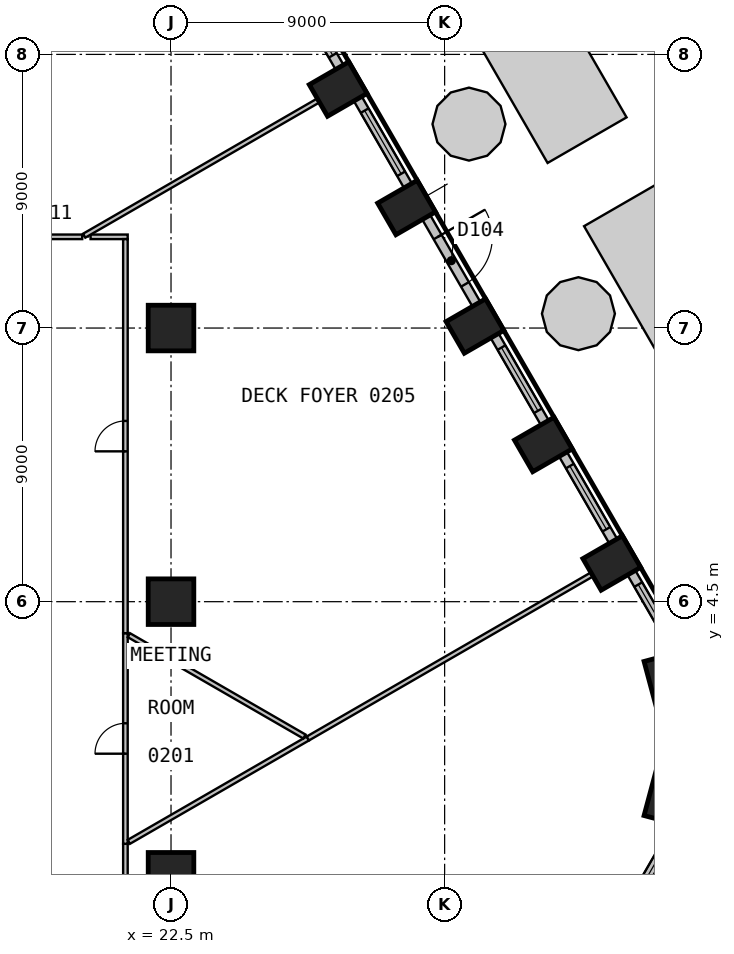
"""IFC4 building model, lengths in metres.
Left out: names, types, materials, properties, quantities, classifications, styles, units other than length and angle.
Written with IfcOpenShell. Run it as: python <this file> out.ifc"""

import sys

from ifc_helpers import new_model, si_unit, direction, frame, frame_2d, origin, origin_2d, place, context, subcontext, project, spatial, polyline, rectangle, circle, outline, extrude, element, fill, save


model = new_model("IFC4")
c1 = context("Model", 3, precision=1e-05, world=origin(), true_north=direction((0.0, 1.0)))
c2 = subcontext(c1, "Body", "Model", "MODEL_VIEW")
j1 = project(units=[si_unit("LENGTHUNIT", "METRE"), si_unit("PLANEANGLEUNIT", "RADIAN")], contexts=[c1])
p1 = place(None, origin())
s1 = spatial("IfcSite", under=j1, at=p1, CompositionType="ELEMENT")
p2 = place(p1, origin())
s2 = spatial("IfcBuilding", under=s1, at=p2, CompositionType="ELEMENT")
p3 = place(p2, frame((0.0, 0.0, 10.8)))
s3 = spatial("IfcBuildingStorey", under=s2, at=p3, CompositionType="ELEMENT", Elevation=10.8)
for number, where, z_axis, x_axis in (
    (1, (38.979, -2.004, 0.0), (0.0, 0.0, 1.0), (0.259, 0.966, 0.0)),
    (2, (38.979, 2.004, 0.0), (0.0, 0.0, 1.0), (-0.259, 0.966, 0.0)),
):
    element("IfcColumn", number, at=place(p3, frame(where, z_axis=z_axis, x_axis=x_axis)), inside=s3, PredefinedType="COLUMN", context=c2, shape_type="SweptSolid", body=[
        extrude(rectangle(XDim=1.5, YDim=1.5, at=origin_2d()), origin(), (0.0, 0.0, 1.0), 4.4),
    ])
for number, where, z_axis, x_axis in (
    (3, (36.998, 5.772, 0.0), (0.0, 0.0, 1.0), (-0.5, 0.866, 0.0)),
    (4, (34.748, 9.669, 0.0), (0.0, 0.0, 1.0), (-0.5, 0.866, 0.0)),
    (5, (32.498, 13.566, 0.0), (0.0, 0.0, 1.0), (-0.5, 0.866, 0.0)),
    (6, (30.248, 17.463, 0.0), (0.0, 0.0, 1.0), (-0.5, 0.866, 0.0)),
    (7, (27.998, 21.361, 0.0), (0.0, 0.0, 1.0), (-0.5, 0.866, 0.0)),
):
    element("IfcColumn", number, at=place(p3, frame(where, z_axis=z_axis, x_axis=x_axis)), inside=s3, PredefinedType="COLUMN", context=c2, shape_type="SweptSolid", body=[
        extrude(rectangle(XDim=1.2, YDim=1.5, at=origin_2d()), origin(), (0.0, 0.0, 1.0), 4.4),
    ])
for number, where, z_axis, x_axis in (
    (8, (22.5, -4.5, 0.0), (0.0, 0.0, 1.0), (1.0, 0.0, 0.0)),
    (9, (22.5, 4.5, 0.0), (0.0, 0.0, 1.0), (1.0, 0.0, 0.0)),
    (10, (22.5, 13.5, 0.0), (0.0, 0.0, 1.0), (1.0, 0.0, 0.0)),
):
    element("IfcColumn", number, at=place(p3, frame(where, z_axis=z_axis, x_axis=x_axis)), inside=s3, PredefinedType="COLUMN", context=c2, shape_type="SweptSolid", body=[
        extrude(circle(Radius=0.75, at=origin_2d()), origin(), (0.0, 0.0, 1.0), 4.4),
    ])
p4 = place(p3, frame((37.644, -5.452, 0.0), z_axis=(0.0, 0.0, 1.0), x_axis=(0.49999586137, 0.866027793211, 0.0)))
e11 = element("IfcWall", 11, at=p4, inside=s3, PredefinedType="SOLIDWALL", context=c2, shape_type="SweptSolid", body=[
    extrude(rectangle(XDim=2.989, YDim=0.3, at=frame_2d((1.494, 0.0))), origin(), (0.0, 0.0, 1.0), 4.4),
])
p5 = place(p4, frame((0.449, 0.0, 0.9)))
e12 = element("IfcOpeningElement", 12, at=p5, cuts=e11, PredefinedType="OPENING", context=c2, shape_type="SweptSolid", body=[
    extrude(rectangle(XDim=2.4, YDim=3.0, at=frame_2d((1.2, 1.5))), frame((0.0, 0.16, 0.0), z_axis=(0.0, -1.0, 0.0), x_axis=(1.0, 0.0, 0.0)), (0.0, 0.0, 1.0), 0.32),
])
p6 = place(p3, frame((39.139, 2.864, 0.0), z_axis=(0.0, 0.0, 1.0), x_axis=(-0.49999586137, 0.866027793211, 0.0)))
e13 = element("IfcWall", 13, at=p6, inside=s3, PredefinedType="SOLIDWALL", context=c2, shape_type="SweptSolid", body=[
    extrude(rectangle(XDim=2.989, YDim=0.3, at=frame_2d((1.494, 0.0))), origin(), (0.0, 0.0, 1.0), 4.4),
])
p7 = place(p6, frame((0.139, 0.0, 0.9)))
e14 = element("IfcOpeningElement", 14, at=p7, cuts=e13, PredefinedType="OPENING", context=c2, shape_type="SweptSolid", body=[
    extrude(rectangle(XDim=2.4, YDim=3.0, at=frame_2d((1.2, 1.5))), frame((0.0, 0.16, 0.0), z_axis=(0.0, -1.0, 0.0), x_axis=(1.0, 0.0, 0.0)), (0.0, 0.0, 1.0), 0.32),
])
p8 = place(p3, frame((37.044, 6.492, 0.0), z_axis=(0.0, 0.0, 1.0), x_axis=(-0.499991515992, 0.866030301974, 0.0)))
e15 = element("IfcWall", 15, at=p8, inside=s3, PredefinedType="SOLIDWALL", context=c2, shape_type="SweptSolid", body=[
    extrude(rectangle(XDim=3.299, YDim=0.3, at=frame_2d((1.649, 0.0))), origin(), (0.0, 0.0, 1.0), 4.4),
])
p9 = place(p8, frame((0.449, 0.0, 0.9)))
e16 = element("IfcOpeningElement", 16, at=p9, cuts=e15, PredefinedType="OPENING", context=c2, shape_type="SweptSolid", body=[
    extrude(rectangle(XDim=2.4, YDim=3.0, at=frame_2d((1.2, 1.5))), frame((0.0, 0.16, 0.0), z_axis=(0.0, -1.0, 0.0), x_axis=(1.0, 0.0, 0.0)), (0.0, 0.0, 1.0), 0.32),
])
p10 = place(p3, frame((34.794, 10.389, 0.0), z_axis=(0.0, 0.0, 1.0), x_axis=(-0.499991515992, 0.866030301974, 0.0)))
e17 = element("IfcWall", 17, at=p10, inside=s3, PredefinedType="SOLIDWALL", context=c2, shape_type="SweptSolid", body=[
    extrude(rectangle(XDim=3.299, YDim=0.3, at=frame_2d((1.649, 0.0))), origin(), (0.0, 0.0, 1.0), 4.4),
])
p11 = place(p10, frame((0.449, 0.0, 0.9)))
e18 = element("IfcOpeningElement", 18, at=p11, cuts=e17, PredefinedType="OPENING", context=c2, shape_type="SweptSolid", body=[
    extrude(rectangle(XDim=2.4, YDim=3.0, at=frame_2d((1.2, 1.5))), frame((0.0, 0.16, 0.0), z_axis=(0.0, -1.0, 0.0), x_axis=(1.0, 0.0, 0.0)), (0.0, 0.0, 1.0), 0.32),
])
p12 = place(p3, frame((30.894, 17.143, 0.0), z_axis=(0.0, 0.0, 1.0), x_axis=(0.499991515992, -0.866030301974, 0.0)))
e19 = element("IfcWall", 19, at=p12, inside=s3, PredefinedType="SOLIDWALL", context=c2, shape_type="SweptSolid", body=[
    extrude(rectangle(XDim=3.299, YDim=0.3, at=frame_2d((1.649, 0.0))), origin(), (0.0, 0.0, 1.0), 4.4),
])
p13 = place(p12, frame((0.75, 0.0, 0.0)))
e20 = element("IfcOpeningElement", 20, at=p13, cuts=e19, PredefinedType="OPENING", context=c2, shape_type="SweptSolid", body=[
    extrude(rectangle(XDim=1.8, YDim=2.4, at=frame_2d((0.9, 1.2))), frame((0.0, 0.16, 0.0), z_axis=(0.0, -1.0, 0.0), x_axis=(1.0, 0.0, 0.0)), (0.0, 0.0, 1.0), 0.32),
])
p14 = place(p3, frame((30.294, 18.184, 0.0), z_axis=(0.0, 0.0, 1.0), x_axis=(-0.499991515992, 0.866030301974, 0.0)))
e21 = element("IfcWall", 21, at=p14, inside=s3, PredefinedType="SOLIDWALL", context=c2, shape_type="SweptSolid", body=[
    extrude(rectangle(XDim=3.299, YDim=0.3, at=frame_2d((1.649, 0.0))), origin(), (0.0, 0.0, 1.0), 4.4),
])
p15 = place(p14, frame((0.449, 0.0, 0.9)))
e22 = element("IfcOpeningElement", 22, at=p15, cuts=e21, PredefinedType="OPENING", context=c2, shape_type="SweptSolid", body=[
    extrude(rectangle(XDim=2.4, YDim=3.0, at=frame_2d((1.2, 1.5))), frame((0.0, 0.16, 0.0), z_axis=(0.0, -1.0, 0.0), x_axis=(1.0, 0.0, 0.0)), (0.0, 0.0, 1.0), 0.32),
])
p16 = place(p3, frame((28.044, 22.081, 0.0), z_axis=(0.0, 0.0, 1.0), x_axis=(-0.499991515992, 0.866030301974, 0.0)))
e23 = element("IfcWall", 23, at=p16, inside=s3, PredefinedType="SOLIDWALL", context=c2, shape_type="SweptSolid", body=[
    extrude(rectangle(XDim=3.299, YDim=0.3, at=frame_2d((1.649, 0.0))), origin(), (0.0, 0.0, 1.0), 4.4),
])
p17 = place(p16, frame((0.449, 0.0, 0.9)))
e24 = element("IfcOpeningElement", 24, at=p17, cuts=e23, PredefinedType="OPENING", context=c2, shape_type="SweptSolid", body=[
    extrude(rectangle(XDim=2.4, YDim=3.0, at=frame_2d((1.2, 1.5))), frame((0.0, 0.16, 0.0), z_axis=(0.0, -1.0, 0.0), x_axis=(1.0, 0.0, 0.0)), (0.0, 0.0, 1.0), 0.32),
])
p18 = place(p3, origin())
e25 = element("IfcWall", 25, at=p18, inside=s3, PredefinedType="SOLIDWALL", context=c2, shape_type="SweptSolid", body=[
    extrude(outline(polyline([(38.684, 18.351), (36.086, 16.851), (43.897, 3.322), (43.897, -3.322), (36.086, -16.851), (38.684, -18.351), (46.897, -4.125), (46.897, 4.125), (38.684, 18.351)])), origin(), (0.0, 0.0, 1.0), 0.9),
])
p19 = place(p3, origin())
e26 = element("IfcWall", 26, at=p19, inside=s3, PredefinedType="SOLIDWALL", context=c2, shape_type="SweptSolid", body=[
    extrude(outline(polyline([(1.2, 38.78), (1.2, 35.78), (21.322, 35.78), (27.075, 32.458), (34.886, 18.929), (37.484, 20.429), (29.271, 34.654), (22.125, 38.78), (1.2, 38.78)])), origin(), (0.0, 0.0, 1.0), 0.9),
])
p20 = place(p3, origin())
e27 = element("IfcWall", 27, at=p20, inside=s3, PredefinedType="SOLIDWALL", context=c2, shape_type="SweptSolid", body=[
    extrude(outline(polyline([(1.2, 44.78), (1.2, 40.78), (22.662, 40.78), (30.736, 36.118), (39.216, 21.429), (42.68, 23.429), (33.664, 39.046), (23.733, 44.78), (1.2, 44.78)])), origin(), (0.0, 0.0, 1.0), 0.9),
])
p21 = place(p3, origin())
e28 = element("IfcWall", 28, at=p21, inside=s3, PredefinedType="SOLIDWALL", context=c2, shape_type="SweptSolid", body=[
    extrude(outline(polyline([(37.101, 13.972), (36.94, 13.372), (36.5, 12.933), (35.901, 12.772), (35.301, 12.933), (34.861, 13.372), (34.701, 13.972), (34.861, 14.572), (35.301, 15.011), (35.901, 15.172), (36.5, 15.011), (36.94, 14.572), (37.101, 13.972)])), origin(), (0.0, 0.0, 1.0), 0.6),
])
p22 = place(p3, origin())
e29 = element("IfcWall", 29, at=p22, inside=s3, PredefinedType="SOLIDWALL", context=c2, shape_type="SweptSolid", body=[
    extrude(outline(polyline([(33.5, 20.208), (33.34, 19.608), (32.901, 19.168), (32.301, 19.008), (31.701, 19.168), (31.261, 19.608), (31.101, 20.208), (31.261, 20.808), (31.701, 21.247), (32.301, 21.408), (32.901, 21.247), (33.34, 20.808), (33.5, 20.208)])), origin(), (0.0, 0.0, 1.0), 0.6),
])
p23 = place(p3, frame((19.579, 16.5, 0.0), z_axis=(0.0, 0.0, 1.0), x_axis=(-1.0, 0.0, 0.0)))
e30 = element("IfcWall", 30, at=p23, inside=s3, PredefinedType="PARTITIONING", context=c2, shape_type="SweptSolid", body=[
    extrude(rectangle(XDim=3.328, YDim=0.15, at=frame_2d((1.664, 0.0))), origin(), (0.0, 0.0, 1.0), 4.4),
])
p24 = place(p23, frame((1.164, 0.0, 0.0)))
e31 = element("IfcOpeningElement", 31, at=p24, cuts=e30, PredefinedType="OPENING", context=c2, shape_type="SweptSolid", body=[
    extrude(rectangle(XDim=1.0, YDim=2.1, at=frame_2d((0.5, 1.05))), frame((0.0, 0.085, 0.0), z_axis=(0.0, -1.0, 0.0), x_axis=(1.0, 0.0, 0.0)), (0.0, 0.0, 1.0), 0.17),
])
p25 = place(p3, frame((19.805, 30.117, 0.0), z_axis=(0.0, 0.0, 1.0), x_axis=(-0.258805468398, -0.965929464054, 0.0)))
e32 = element("IfcWall", 32, at=p25, inside=s3, PredefinedType="PARTITIONING", context=c2, shape_type="SweptSolid", body=[
    extrude(rectangle(XDim=9.439, YDim=0.15, at=frame_2d((4.719, 0.0))), origin(), (0.0, 0.0, 1.0), 4.4),
])
p26 = place(p3, frame((21.075, 16.5, 0.0), z_axis=(0.0, 0.0, 1.0), x_axis=(-1.0, 0.0, 0.0)))
e33 = element("IfcWall", 33, at=p26, inside=s3, PredefinedType="PARTITIONING", context=c2, shape_type="SweptSolid", body=[
    extrude(rectangle(XDim=1.221, YDim=0.15, at=frame_2d((0.61, 0.0))), origin(), (0.0, 0.0, 1.0), 4.4),
])
p27 = place(p3, frame((27.331, 20.976, 0.0), z_axis=(0.0, 0.0, 1.0), x_axis=(-0.866000072607, -0.50004387232, 0.0)))
e34 = element("IfcWall", 34, at=p27, inside=s3, PredefinedType="PARTITIONING", context=c2, shape_type="SweptSolid", body=[
    extrude(rectangle(XDim=8.876, YDim=0.15, at=frame_2d((4.438, 0.0))), origin(), (0.0, 0.0, 1.0), 4.4),
])
p28 = place(p3, frame((21.0, -16.425, 0.0), z_axis=(0.0, 0.0, 1.0), x_axis=(0.0, 1.0, 0.0)))
e35 = element("IfcWall", 35, at=p28, inside=s3, PredefinedType="PARTITIONING", context=c2, shape_type="SweptSolid", body=[
    extrude(rectangle(XDim=12.961, YDim=0.15, at=frame_2d((6.48, 0.0))), origin(), (0.0, 0.0, 1.0), 4.4),
])
p29 = place(p28, frame((5.98, 0.0, 0.0)))
e36 = element("IfcOpeningElement", 36, at=p29, cuts=e35, PredefinedType="OPENING", context=c2, shape_type="SweptSolid", body=[
    extrude(rectangle(XDim=1.0, YDim=2.1, at=frame_2d((0.5, 1.05))), frame((0.0, 0.085, 0.0), z_axis=(0.0, -1.0, 0.0), x_axis=(1.0, 0.0, 0.0)), (0.0, 0.0, 1.0), 0.17),
])
p30 = place(p3, frame((21.0, -3.464, 0.0), z_axis=(0.0, 0.0, 1.0), x_axis=(0.0, 1.0, 0.0)))
e37 = element("IfcWall", 37, at=p30, inside=s3, PredefinedType="PARTITIONING", context=c2, shape_type="SweptSolid", body=[
    extrude(rectangle(XDim=6.928, YDim=0.15, at=frame_2d((3.464, 0.0))), origin(), (0.0, 0.0, 1.0), 4.4),
])
p31 = place(p30, frame((2.964, 0.0, 0.0)))
e38 = element("IfcOpeningElement", 38, at=p31, cuts=e37, PredefinedType="OPENING", context=c2, shape_type="SweptSolid", body=[
    extrude(rectangle(XDim=1.0, YDim=2.1, at=frame_2d((0.5, 1.05))), frame((0.0, 0.085, 0.0), z_axis=(0.0, -1.0, 0.0), x_axis=(1.0, 0.0, 0.0)), (0.0, 0.0, 1.0), 0.17),
])
p32 = place(p3, frame((27.0, 0.0, 0.0), z_axis=(0.0, 0.0, 1.0), x_axis=(-0.866037871166, -0.49997840524, 0.0)))
e39 = element("IfcWall", 39, at=p32, inside=s3, PredefinedType="PARTITIONING", context=c2, shape_type="SweptSolid", body=[
    extrude(rectangle(XDim=6.798, YDim=0.15, at=frame_2d((3.399, 0.0))), origin(), (0.0, 0.0, 1.0), 4.4),
])
p33 = place(p3, frame((21.0, 3.464, 0.0), z_axis=(0.0, 0.0, 1.0), x_axis=(0.0, 1.0, 0.0)))
e40 = element("IfcWall", 40, at=p33, inside=s3, PredefinedType="PARTITIONING", context=c2, shape_type="SweptSolid", body=[
    extrude(rectangle(XDim=12.961, YDim=0.15, at=frame_2d((6.48, 0.0))), origin(), (0.0, 0.0, 1.0), 4.4),
])
p34 = place(p33, frame((5.98, 0.0, 0.0)))
e41 = element("IfcOpeningElement", 41, at=p34, cuts=e40, PredefinedType="OPENING", context=c2, shape_type="SweptSolid", body=[
    extrude(rectangle(XDim=1.0, YDim=2.1, at=frame_2d((0.5, 1.05))), frame((0.0, 0.085, 0.0), z_axis=(0.0, -1.0, 0.0), x_axis=(1.0, 0.0, 0.0)), (0.0, 0.0, 1.0), 0.17),
])
p35 = place(p3, frame((21.113, 3.399, 0.0), z_axis=(0.0, 0.0, 1.0), x_axis=(0.8660356018, -0.499982336103, 0.0)))
e42 = element("IfcWall", 42, at=p35, inside=s3, PredefinedType="PARTITIONING", context=c2, shape_type="SweptSolid", body=[
    extrude(rectangle(XDim=6.668, YDim=0.15, at=frame_2d((3.334, 0.0))), origin(), (0.0, 0.0, 1.0), 4.4),
])
p36 = place(p3, frame((36.331, 5.387, 0.0), z_axis=(0.0, 0.0, 1.0), x_axis=(-0.866022950206, -0.500004249699, 0.0)))
e43 = element("IfcWall", 43, at=p36, inside=s3, PredefinedType="PARTITIONING", context=c2, shape_type="SweptSolid", body=[
    extrude(rectangle(XDim=10.774, YDim=0.15, at=frame_2d((5.387, 0.0))), origin(), (0.0, 0.0, 1.0), 4.4),
])
p37 = place(p5, origin())
e44 = element("IfcWindow", 44, at=p37, inside=s3, PartitioningType="SINGLE_PANEL", PredefinedType="WINDOW", context=c2, shape_type="SweptSolid", body=[
    extrude(rectangle(XDim=2.4, YDim=3.0, at=frame_2d((1.2, 1.5))), frame((0.0, 0.03, 0.0), z_axis=(0.0, -1.0, 0.0), x_axis=(1.0, 0.0, 0.0)), (0.0, 0.0, 1.0), 0.06),
])
fill(e12, e44)
p38 = place(p7, origin())
e45 = element("IfcWindow", 45, at=p38, inside=s3, PartitioningType="SINGLE_PANEL", PredefinedType="WINDOW", context=c2, shape_type="SweptSolid", body=[
    extrude(rectangle(XDim=2.4, YDim=3.0, at=frame_2d((1.2, 1.5))), frame((0.0, 0.03, 0.0), z_axis=(0.0, -1.0, 0.0), x_axis=(1.0, 0.0, 0.0)), (0.0, 0.0, 1.0), 0.06),
])
fill(e14, e45)
p39 = place(p9, origin())
e46 = element("IfcWindow", 46, at=p39, inside=s3, PartitioningType="SINGLE_PANEL", PredefinedType="WINDOW", context=c2, shape_type="SweptSolid", body=[
    extrude(rectangle(XDim=2.4, YDim=3.0, at=frame_2d((1.2, 1.5))), frame((0.0, 0.03, 0.0), z_axis=(0.0, -1.0, 0.0), x_axis=(1.0, 0.0, 0.0)), (0.0, 0.0, 1.0), 0.06),
])
fill(e16, e46)
p40 = place(p11, origin())
e47 = element("IfcWindow", 47, at=p40, inside=s3, PartitioningType="SINGLE_PANEL", PredefinedType="WINDOW", context=c2, shape_type="SweptSolid", body=[
    extrude(rectangle(XDim=2.4, YDim=3.0, at=frame_2d((1.2, 1.5))), frame((0.0, 0.03, 0.0), z_axis=(0.0, -1.0, 0.0), x_axis=(1.0, 0.0, 0.0)), (0.0, 0.0, 1.0), 0.06),
])
fill(e18, e47)
p41 = place(p13, origin())
e48 = element("IfcDoor", 48, at=p41, inside=s3, OperationType="DOUBLE_DOOR_SINGLE_SWING", PredefinedType="DOOR", context=c2, shape_type="SweptSolid", body=[
    extrude(rectangle(XDim=1.8, YDim=2.4, at=frame_2d((0.9, 1.2))), frame((0.0, 0.025, 0.0), z_axis=(0.0, -1.0, 0.0), x_axis=(1.0, 0.0, 0.0)), (0.0, 0.0, 1.0), 0.05),
])
fill(e20, e48)
p42 = place(p15, origin())
e49 = element("IfcWindow", 49, at=p42, inside=s3, PartitioningType="SINGLE_PANEL", PredefinedType="WINDOW", context=c2, shape_type="SweptSolid", body=[
    extrude(rectangle(XDim=2.4, YDim=3.0, at=frame_2d((1.2, 1.5))), frame((0.0, 0.03, 0.0), z_axis=(0.0, -1.0, 0.0), x_axis=(1.0, 0.0, 0.0)), (0.0, 0.0, 1.0), 0.06),
])
fill(e22, e49)
p43 = place(p17, origin())
e50 = element("IfcWindow", 50, at=p43, inside=s3, PartitioningType="SINGLE_PANEL", PredefinedType="WINDOW", context=c2, shape_type="SweptSolid", body=[
    extrude(rectangle(XDim=2.4, YDim=3.0, at=frame_2d((1.2, 1.5))), frame((0.0, 0.03, 0.0), z_axis=(0.0, -1.0, 0.0), x_axis=(1.0, 0.0, 0.0)), (0.0, 0.0, 1.0), 0.06),
])
fill(e24, e50)
p44 = place(p31, origin())
e51 = element("IfcDoor", 51, at=p44, inside=s3, OperationType="SINGLE_SWING_LEFT", PredefinedType="DOOR", context=c2, shape_type="SweptSolid", body=[
    extrude(rectangle(XDim=1.0, YDim=2.1, at=frame_2d((0.5, 1.05))), frame((0.0, 0.025, 0.0), z_axis=(0.0, -1.0, 0.0), x_axis=(1.0, 0.0, 0.0)), (0.0, 0.0, 1.0), 0.05),
])
fill(e38, e51)
p45 = place(p34, origin())
e52 = element("IfcDoor", 52, at=p45, inside=s3, OperationType="SINGLE_SWING_RIGHT", PredefinedType="DOOR", context=c2, shape_type="SweptSolid", body=[
    extrude(rectangle(XDim=1.0, YDim=2.1, at=frame_2d((0.5, 1.05))), frame((0.0, 0.025, 0.0), z_axis=(0.0, -1.0, 0.0), x_axis=(1.0, 0.0, 0.0)), (0.0, 0.0, 1.0), 0.05),
])
fill(e41, e52)
save(model, sys.argv[1])
